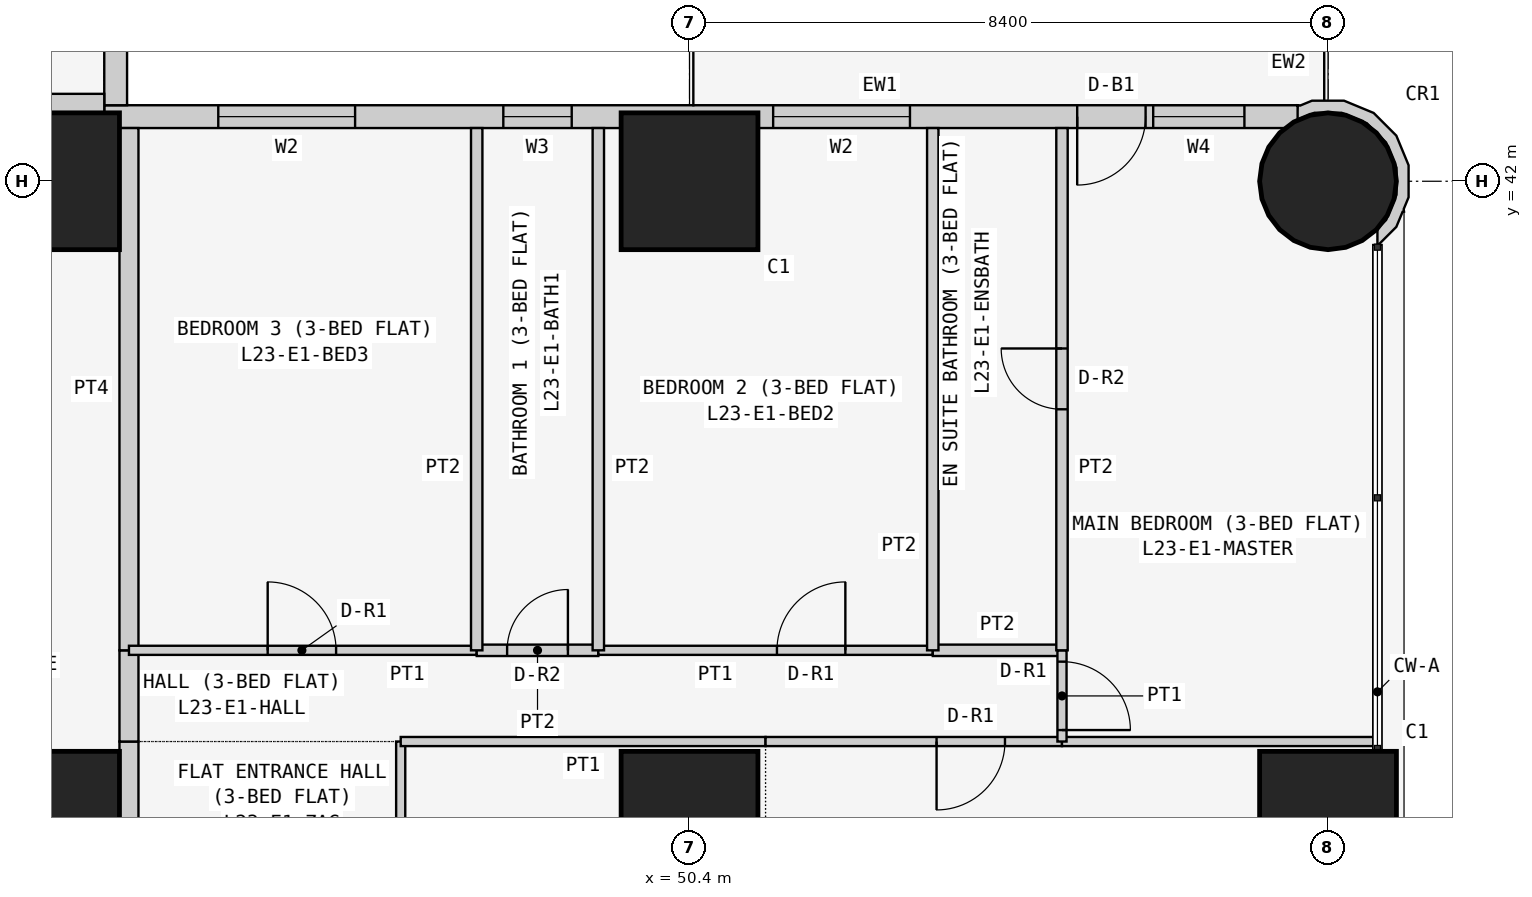
"""IFC4 building model, lengths in metres.
Left out: names, types, materials, properties, quantities, classifications, styles, units other than length and angle.
Written with IfcOpenShell. Run it as: python <this file> out.ifc"""

import sys

from ifc_helpers import new_model, si_unit, direction, frame, frame_2d, origin, origin_2d, place, context, subcontext, project, spatial, polyline, rectangle, circle, outline, extrude, element, fill, save


model = new_model("IFC4")
c1 = context("Model", 3, precision=1e-05, world=origin(), true_north=direction((0.0, 1.0)))
c2 = subcontext(c1, "Body", "Model", "MODEL_VIEW")
j1 = project(units=[si_unit("LENGTHUNIT", "METRE"), si_unit("PLANEANGLEUNIT", "RADIAN")], contexts=[c1])
p1 = place(None, origin())
s1 = spatial("IfcSite", under=j1, at=p1, CompositionType="ELEMENT")
p2 = place(p1, origin())
s2 = spatial("IfcBuilding", under=s1, at=p2, CompositionType="ELEMENT")
p3 = place(p2, frame((0.0, 0.0, 92.1)))
s3 = spatial("IfcBuildingStorey", under=s2, at=p3, CompositionType="ELEMENT", Elevation=92.1)
for number, where, z_axis, x_axis in (
    (1, (42.0, 33.6, 0.0), (0.0, 0.0, 1.0), (1.0, 0.0, 0.0)),
    (2, (42.0, 42.0, 0.0), (0.0, 0.0, 1.0), (1.0, 0.0, 0.0)),
    (3, (50.4, 33.6, 0.0), (0.0, 0.0, 1.0), (1.0, 0.0, 0.0)),
    (4, (50.4, 42.0, 0.0), (0.0, 0.0, 1.0), (1.0, 0.0, 0.0)),
    (5, (58.8, 33.6, 0.0), (0.0, 0.0, 1.0), (1.0, 0.0, 0.0)),
):
    element("IfcColumn", number, at=place(p3, frame(where, z_axis=z_axis, x_axis=x_axis)), inside=s3, PredefinedType="COLUMN", context=c2, shape_type="SweptSolid", body=[
        extrude(rectangle(XDim=1.8, YDim=1.8, at=origin_2d()), origin(), (0.0, 0.0, 1.0), 3.6),
    ])
p4 = place(p3, frame((58.8, 42.0, 0.0), z_axis=(0.0, 0.0, 1.0), x_axis=(1.0, 0.0, 0.0)))
e6 = element("IfcColumn", 6, at=p4, inside=s3, PredefinedType="COLUMN", context=c2, shape_type="SweptSolid", body=[
    extrude(circle(Radius=0.9, at=origin_2d()), origin(), (0.0, 0.0, 1.0), 3.6),
])
p5 = place(p3, frame((58.4, 42.85, 0.0), z_axis=(0.0, 0.0, 1.0), x_axis=(-1.0, 0.0, 0.0)))
e7 = element("IfcWall", 7, at=p5, inside=s3, PredefinedType="SOLIDWALL", context=c2, shape_type="SweptSolid", body=[
    extrude(rectangle(XDim=15.7, YDim=0.3, at=frame_2d((7.85, 0.0))), origin(), (0.0, 0.0, 1.0), 3.45),
])
p6 = place(p5, frame((12.4, 0.0, 0.9)))
e8 = element("IfcOpeningElement", 8, at=p6, cuts=e7, PredefinedType="OPENING", context=c2, shape_type="SweptSolid", body=[
    extrude(rectangle(XDim=1.8, YDim=1.5, at=frame_2d((0.9, 0.75))), frame((0.0, 0.16, 0.0), z_axis=(0.0, -1.0, 0.0), x_axis=(1.0, 0.0, 0.0)), (0.0, 0.0, 1.0), 0.32),
])
p7 = place(p5, frame((9.55, 0.0, 1.5)))
e9 = element("IfcOpeningElement", 9, at=p7, cuts=e7, PredefinedType="OPENING", context=c2, shape_type="SweptSolid", body=[
    extrude(rectangle(XDim=0.9, YDim=0.7, at=frame_2d((0.45, 0.35))), frame((0.0, 0.16, 0.0), z_axis=(0.0, -1.0, 0.0), x_axis=(1.0, 0.0, 0.0)), (0.0, 0.0, 1.0), 0.32),
])
p8 = place(p5, frame((5.1, 0.0, 0.9)))
e10 = element("IfcOpeningElement", 10, at=p8, cuts=e7, PredefinedType="OPENING", context=c2, shape_type="SweptSolid", body=[
    extrude(rectangle(XDim=1.8, YDim=1.5, at=frame_2d((0.9, 0.75))), frame((0.0, 0.16, 0.0), z_axis=(0.0, -1.0, 0.0), x_axis=(1.0, 0.0, 0.0)), (0.0, 0.0, 1.0), 0.32),
])
p9 = place(p5, frame((2.0, 0.0, 0.0)))
e11 = element("IfcOpeningElement", 11, at=p9, cuts=e7, PredefinedType="OPENING", context=c2, shape_type="SweptSolid", body=[
    extrude(rectangle(XDim=0.9, YDim=2.4, at=frame_2d((0.45, 1.2))), frame((0.0, 0.16, 0.0), z_axis=(0.0, -1.0, 0.0), x_axis=(1.0, 0.0, 0.0)), (0.0, 0.0, 1.0), 0.32),
])
p10 = place(p5, frame((0.7, 0.0, 0.9)))
e12 = element("IfcOpeningElement", 12, at=p10, cuts=e7, PredefinedType="OPENING", context=c2, shape_type="SweptSolid", body=[
    extrude(rectangle(XDim=1.2, YDim=1.5, at=frame_2d((0.6, 0.75))), frame((0.0, 0.16, 0.0), z_axis=(0.0, -1.0, 0.0), x_axis=(1.0, 0.0, 0.0)), (0.0, 0.0, 1.0), 0.32),
])
p11 = place(p3, frame((42.85, 43.0, 0.0), z_axis=(0.0, 0.0, 1.0), x_axis=(0.0, 1.0, 0.0)))
e13 = element("IfcWall", 13, at=p11, inside=s3, PredefinedType="SOLIDWALL", context=c2, shape_type="SweptSolid", body=[
    extrude(rectangle(XDim=15.4, YDim=0.3, at=frame_2d((7.7, 0.0))), origin(), (0.0, 0.0, 1.0), 3.45),
])
p12 = place(p11, frame((1.2, 0.0, 0.9)))
e14 = element("IfcOpeningElement", 14, at=p12, cuts=e13, PredefinedType="OPENING", context=c2, shape_type="SweptSolid", body=[
    extrude(rectangle(XDim=1.8, YDim=1.5, at=frame_2d((0.9, 0.75))), frame((0.0, 0.16, 0.0), z_axis=(0.0, -1.0, 0.0), x_axis=(1.0, 0.0, 0.0)), (0.0, 0.0, 1.0), 0.32),
])
p13 = place(p11, frame((4.95, 0.0, 1.5)))
e15 = element("IfcOpeningElement", 15, at=p13, cuts=e13, PredefinedType="OPENING", context=c2, shape_type="SweptSolid", body=[
    extrude(rectangle(XDim=0.9, YDim=0.7, at=frame_2d((0.45, 0.35))), frame((0.0, 0.16, 0.0), z_axis=(0.0, -1.0, 0.0), x_axis=(1.0, 0.0, 0.0)), (0.0, 0.0, 1.0), 0.32),
])
p14 = place(p11, frame((8.5, 0.0, 0.9)))
e16 = element("IfcOpeningElement", 16, at=p14, cuts=e13, PredefinedType="OPENING", context=c2, shape_type="SweptSolid", body=[
    extrude(rectangle(XDim=1.8, YDim=1.5, at=frame_2d((0.9, 0.75))), frame((0.0, 0.16, 0.0), z_axis=(0.0, -1.0, 0.0), x_axis=(1.0, 0.0, 0.0)), (0.0, 0.0, 1.0), 0.32),
])
p15 = place(p11, frame((12.5, 0.0, 0.0)))
e17 = element("IfcOpeningElement", 17, at=p15, cuts=e13, PredefinedType="OPENING", context=c2, shape_type="SweptSolid", body=[
    extrude(rectangle(XDim=0.9, YDim=2.4, at=frame_2d((0.45, 1.2))), frame((0.0, 0.16, 0.0), z_axis=(0.0, -1.0, 0.0), x_axis=(1.0, 0.0, 0.0)), (0.0, 0.0, 1.0), 0.32),
])
p16 = place(p11, frame((13.5, 0.0, 0.9)))
e18 = element("IfcOpeningElement", 18, at=p16, cuts=e13, PredefinedType="OPENING", context=c2, shape_type="SweptSolid", body=[
    extrude(rectangle(XDim=1.2, YDim=1.5, at=frame_2d((0.6, 0.75))), frame((0.0, 0.16, 0.0), z_axis=(0.0, -1.0, 0.0), x_axis=(1.0, 0.0, 0.0)), (0.0, 0.0, 1.0), 0.32),
])
p17 = place(p3, frame((59.411, 41.233, 0.0), z_axis=(0.0, 0.0, 1.0), x_axis=(0.926129809145, 0.377204953059, 0.0)))
e19 = element("IfcWall", 19, at=p17, inside=s3, PredefinedType="SOLIDWALL", context=c2, shape_type="SweptSolid", body=[
    extrude(outline(polyline([(0.626, 0.345), (0.785, 0.736), (0.782, 1.157), (0.619, 1.546), (0.319, 1.843), (-0.072, 2.002), (-0.24, 2.001), (-0.27, 2.017), (-0.37, 1.841), (-0.102, 1.842), (0.23, 1.707), (0.485, 1.455), (0.624, 1.125), (0.626, 0.766), (0.491, 0.434), (0.238, 0.179), (0.09, 0.117), (0.011, -0.078), (0.024, -0.083), (0.329, 0.045), (0.48, 0.198), (0.499, 0.193), (0.508, 0.225), (0.626, 0.345)])), origin(), (0.0, 0.0, 1.0), 3.45),
])
p18 = place(p3, frame((36.229, 43.025, 0.0), z_axis=(0.0, 0.0, 1.0), x_axis=(1.0, 0.0, 0.0)))
e20 = element("IfcWall", 20, at=p18, inside=s3, PredefinedType="PARTITIONING", context=c2, shape_type="SweptSolid", body=[
    extrude(rectangle(XDim=6.471, YDim=0.25, at=frame_2d((3.235, 0.0))), origin(), (0.0, 0.0, 1.0), 3.45),
])
p19 = place(p3, frame((43.025, 34.629, 0.0), z_axis=(0.0, 0.0, 1.0), x_axis=(0.0, -1.0, 0.0)))
e21 = element("IfcWall", 21, at=p19, inside=s3, PredefinedType="PARTITIONING", context=c2, shape_type="SweptSolid", body=[
    extrude(rectangle(XDim=5.229, YDim=0.25, at=frame_2d((2.615, 0.0))), origin(), (0.0, 0.0, 1.0), 3.45),
])
p20 = place(p19, frame((2.129, 0.0, 0.0)))
e22 = element("IfcOpeningElement", 22, at=p20, cuts=e21, PredefinedType="OPENING", context=c2, shape_type="SweptSolid", body=[
    extrude(rectangle(XDim=1.0, YDim=2.1, at=frame_2d((0.5, 1.05))), frame((0.0, 0.135, 0.0), z_axis=(0.0, -1.0, 0.0), x_axis=(1.0, 0.0, 0.0)), (0.0, 0.0, 1.0), 0.27),
])
p21 = place(p3, frame((43.025, 35.829, 0.0), z_axis=(0.0, 0.0, 1.0), x_axis=(0.0, -1.0, 0.0)))
e23 = element("IfcWall", 23, at=p21, inside=s3, PredefinedType="PARTITIONING", context=c2, shape_type="SweptSolid", body=[
    extrude(rectangle(XDim=1.2, YDim=0.25, at=frame_2d((0.6, 0.0))), origin(), (0.0, 0.0, 1.0), 3.45),
])
p22 = place(p3, frame((43.025, 42.7, 0.0), z_axis=(0.0, 0.0, 1.0), x_axis=(0.0, -1.0, 0.0)))
e24 = element("IfcWall", 24, at=p22, inside=s3, PredefinedType="PARTITIONING", context=c2, shape_type="SweptSolid", body=[
    extrude(rectangle(XDim=6.871, YDim=0.25, at=frame_2d((3.436, 0.0))), origin(), (0.0, 0.0, 1.0), 3.45),
])
p23 = place(p3, frame((46.6, 29.4, 0.0), z_axis=(0.0, 0.0, 1.0), x_axis=(0.0, 1.0, 0.0)))
e25 = element("IfcWall", 25, at=p23, inside=s3, PredefinedType="PARTITIONING", context=c2, shape_type="SweptSolid", body=[
    extrude(rectangle(XDim=5.229, YDim=0.12, at=frame_2d((2.615, 0.0))), origin(), (0.0, 0.0, 1.0), 3.45),
])
p24 = place(p23, frame((1.05, 0.0, 0.0)))
e26 = element("IfcOpeningElement", 26, at=p24, cuts=e25, PredefinedType="OPENING", context=c2, shape_type="SweptSolid", body=[
    extrude(rectangle(XDim=0.9, YDim=2.1, at=frame_2d((0.45, 1.05))), frame((0.0, 0.07, 0.0), z_axis=(0.0, -1.0, 0.0), x_axis=(1.0, 0.0, 0.0)), (0.0, 0.0, 1.0), 0.14),
])
p25 = place(p3, frame((51.4, 34.629, 0.0), z_axis=(0.0, 0.0, 1.0), x_axis=(-1.0, 0.0, 0.0)))
e27 = element("IfcWall", 27, at=p25, inside=s3, PredefinedType="PARTITIONING", context=c2, shape_type="SweptSolid", body=[
    extrude(rectangle(XDim=4.8, YDim=0.12, at=frame_2d((2.4, 0.0))), origin(), (0.0, 0.0, 1.0), 3.45),
])
p26 = place(p3, frame((55.3, 34.629, 0.0), z_axis=(0.0, 0.0, 1.0), x_axis=(-1.0, 0.0, 0.0)))
e28 = element("IfcWall", 28, at=p26, inside=s3, PredefinedType="PARTITIONING", context=c2, shape_type="SweptSolid", body=[
    extrude(rectangle(XDim=3.9, YDim=0.12, at=frame_2d((1.95, 0.0))), origin(), (0.0, 0.0, 1.0), 3.45),
])
p27 = place(p26, frame((0.75, 0.0, 0.0)))
e29 = element("IfcOpeningElement", 29, at=p27, cuts=e28, PredefinedType="OPENING", context=c2, shape_type="SweptSolid", body=[
    extrude(rectangle(XDim=0.9, YDim=2.1, at=frame_2d((0.45, 1.05))), frame((0.0, 0.07, 0.0), z_axis=(0.0, -1.0, 0.0), x_axis=(1.0, 0.0, 0.0)), (0.0, 0.0, 1.0), 0.14),
])
p28 = place(p3, frame((59.45, 34.629, 0.0), z_axis=(0.0, 0.0, 1.0), x_axis=(-1.0, 0.0, 0.0)))
e30 = element("IfcWall", 30, at=p28, inside=s3, PredefinedType="PARTITIONING", context=c2, shape_type="SweptSolid", body=[
    extrude(rectangle(XDim=4.15, YDim=0.12, at=frame_2d((2.075, 0.0))), origin(), (0.0, 0.0, 1.0), 3.45),
])
p29 = place(p3, frame((47.6, 35.829, 0.0), z_axis=(0.0, 0.0, 1.0), x_axis=(-1.0, 0.0, 0.0)))
e31 = element("IfcWall", 31, at=p29, inside=s3, PredefinedType="PARTITIONING", context=c2, shape_type="SweptSolid", body=[
    extrude(rectangle(XDim=4.575, YDim=0.12, at=frame_2d((2.288, 0.0))), origin(), (0.0, 0.0, 1.0), 3.45),
])
p30 = place(p29, frame((1.85, 0.0, 0.0)))
e32 = element("IfcOpeningElement", 32, at=p30, cuts=e31, PredefinedType="OPENING", context=c2, shape_type="SweptSolid", body=[
    extrude(rectangle(XDim=0.9, YDim=2.1, at=frame_2d((0.45, 1.05))), frame((0.0, 0.07, 0.0), z_axis=(0.0, -1.0, 0.0), x_axis=(1.0, 0.0, 0.0)), (0.0, 0.0, 1.0), 0.14),
])
p31 = place(p3, frame((49.2, 35.829, 0.0), z_axis=(0.0, 0.0, 1.0), x_axis=(-1.0, 0.0, 0.0)))
e33 = element("IfcWall", 33, at=p31, inside=s3, PredefinedType="PARTITIONING", context=c2, shape_type="SweptSolid", body=[
    extrude(rectangle(XDim=1.6, YDim=0.15, at=frame_2d((0.8, 0.0))), origin(), (0.0, 0.0, 1.0), 3.45),
])
p32 = place(p31, frame((0.4, 0.0, 0.0)))
e34 = element("IfcOpeningElement", 34, at=p32, cuts=e33, PredefinedType="OPENING", context=c2, shape_type="SweptSolid", body=[
    extrude(rectangle(XDim=0.8, YDim=2.1, at=frame_2d((0.4, 1.05))), frame((0.0, 0.085, 0.0), z_axis=(0.0, -1.0, 0.0), x_axis=(1.0, 0.0, 0.0)), (0.0, 0.0, 1.0), 0.17),
])
p33 = place(p3, frame((53.6, 35.829, 0.0), z_axis=(0.0, 0.0, 1.0), x_axis=(-1.0, 0.0, 0.0)))
e35 = element("IfcWall", 35, at=p33, inside=s3, PredefinedType="PARTITIONING", context=c2, shape_type="SweptSolid", body=[
    extrude(rectangle(XDim=4.4, YDim=0.12, at=frame_2d((2.2, 0.0))), origin(), (0.0, 0.0, 1.0), 3.45),
])
p34 = place(p33, frame((1.15, 0.0, 0.0)))
e36 = element("IfcOpeningElement", 36, at=p34, cuts=e35, PredefinedType="OPENING", context=c2, shape_type="SweptSolid", body=[
    extrude(rectangle(XDim=0.9, YDim=2.1, at=frame_2d((0.45, 1.05))), frame((0.0, 0.07, 0.0), z_axis=(0.0, -1.0, 0.0), x_axis=(1.0, 0.0, 0.0)), (0.0, 0.0, 1.0), 0.14),
])
p35 = place(p3, frame((55.3, 35.829, 0.0), z_axis=(0.0, 0.0, 1.0), x_axis=(-1.0, 0.0, 0.0)))
e37 = element("IfcWall", 37, at=p35, inside=s3, PredefinedType="PARTITIONING", context=c2, shape_type="SweptSolid", body=[
    extrude(rectangle(XDim=1.7, YDim=0.15, at=frame_2d((0.85, 0.0))), origin(), (0.0, 0.0, 1.0), 3.45),
])
p36 = place(p3, frame((55.3, 34.629, 0.0), z_axis=(0.0, 0.0, 1.0), x_axis=(0.0, 1.0, 0.0)))
e38 = element("IfcWall", 38, at=p36, inside=s3, PredefinedType="PARTITIONING", context=c2, shape_type="SweptSolid", body=[
    extrude(rectangle(XDim=1.2, YDim=0.12, at=frame_2d((0.6, 0.0))), origin(), (0.0, 0.0, 1.0), 3.45),
])
p37 = place(p36, frame((0.151, 0.0, 0.0)))
e39 = element("IfcOpeningElement", 39, at=p37, cuts=e38, PredefinedType="OPENING", context=c2, shape_type="SweptSolid", body=[
    extrude(rectangle(XDim=0.9, YDim=2.1, at=frame_2d((0.45, 1.05))), frame((0.0, 0.07, 0.0), z_axis=(0.0, -1.0, 0.0), x_axis=(1.0, 0.0, 0.0)), (0.0, 0.0, 1.0), 0.14),
])
for number, where, z_axis, x_axis in (
    (40, (47.6, 35.829, 0.0), (0.0, 0.0, 1.0), (0.0, 1.0, 0.0)),
    (41, (49.2, 35.829, 0.0), (0.0, 0.0, 1.0), (0.0, 1.0, 0.0)),
    (42, (53.6, 35.829, 0.0), (0.0, 0.0, 1.0), (0.0, 1.0, 0.0)),
):
    element("IfcWall", number, at=place(p3, frame(where, z_axis=z_axis, x_axis=x_axis)), inside=s3, PredefinedType="PARTITIONING", context=c2, shape_type="SweptSolid", body=[
        extrude(rectangle(XDim=6.871, YDim=0.15, at=frame_2d((3.436, 0.0))), origin(), (0.0, 0.0, 1.0), 3.45),
    ])
p38 = place(p3, frame((55.3, 35.829, 0.0), z_axis=(0.0, 0.0, 1.0), x_axis=(0.0, 1.0, 0.0)))
e43 = element("IfcWall", 43, at=p38, inside=s3, PredefinedType="PARTITIONING", context=c2, shape_type="SweptSolid", body=[
    extrude(rectangle(XDim=6.871, YDim=0.15, at=frame_2d((3.436, 0.0))), origin(), (0.0, 0.0, 1.0), 3.45),
])
p39 = place(p38, frame((3.171, 0.0, 0.0)))
e44 = element("IfcOpeningElement", 44, at=p39, cuts=e43, PredefinedType="OPENING", context=c2, shape_type="SweptSolid", body=[
    extrude(rectangle(XDim=0.8, YDim=2.1, at=frame_2d((0.4, 1.05))), frame((0.0, 0.085, 0.0), z_axis=(0.0, -1.0, 0.0), x_axis=(1.0, 0.0, 0.0)), (0.0, 0.0, 1.0), 0.17),
])
p40 = place(p6, origin())
e45 = element("IfcWindow", 45, at=p40, inside=s3, PartitioningType="SINGLE_PANEL", PredefinedType="WINDOW", context=c2, shape_type="SweptSolid", body=[
    extrude(rectangle(XDim=1.8, YDim=1.5, at=frame_2d((0.9, 0.75))), frame((0.0, 0.03, 0.0), z_axis=(0.0, -1.0, 0.0), x_axis=(1.0, 0.0, 0.0)), (0.0, 0.0, 1.0), 0.06),
])
fill(e8, e45)
p41 = place(p7, origin())
e46 = element("IfcWindow", 46, at=p41, inside=s3, PartitioningType="SINGLE_PANEL", PredefinedType="WINDOW", context=c2, shape_type="SweptSolid", body=[
    extrude(rectangle(XDim=0.9, YDim=0.7, at=frame_2d((0.45, 0.35))), frame((0.0, 0.03, 0.0), z_axis=(0.0, -1.0, 0.0), x_axis=(1.0, 0.0, 0.0)), (0.0, 0.0, 1.0), 0.06),
])
fill(e9, e46)
p42 = place(p8, origin())
e47 = element("IfcWindow", 47, at=p42, inside=s3, PartitioningType="SINGLE_PANEL", PredefinedType="WINDOW", context=c2, shape_type="SweptSolid", body=[
    extrude(rectangle(XDim=1.8, YDim=1.5, at=frame_2d((0.9, 0.75))), frame((0.0, 0.03, 0.0), z_axis=(0.0, -1.0, 0.0), x_axis=(1.0, 0.0, 0.0)), (0.0, 0.0, 1.0), 0.06),
])
fill(e10, e47)
p43 = place(p9, origin())
e48 = element("IfcDoor", 48, at=p43, inside=s3, OperationType="SINGLE_SWING_RIGHT", PredefinedType="DOOR", context=c2, shape_type="SweptSolid", body=[
    extrude(rectangle(XDim=0.9, YDim=2.4, at=frame_2d((0.45, 1.2))), frame((0.0, 0.025, 0.0), z_axis=(0.0, -1.0, 0.0), x_axis=(1.0, 0.0, 0.0)), (0.0, 0.0, 1.0), 0.05),
])
fill(e11, e48)
p44 = place(p10, origin())
e49 = element("IfcWindow", 49, at=p44, inside=s3, PartitioningType="SINGLE_PANEL", PredefinedType="WINDOW", context=c2, shape_type="SweptSolid", body=[
    extrude(rectangle(XDim=1.2, YDim=1.5, at=frame_2d((0.6, 0.75))), frame((0.0, 0.03, 0.0), z_axis=(0.0, -1.0, 0.0), x_axis=(1.0, 0.0, 0.0)), (0.0, 0.0, 1.0), 0.06),
])
fill(e12, e49)
p45 = place(p27, origin())
e50 = element("IfcDoor", 50, at=p45, inside=s3, OperationType="SINGLE_SWING_RIGHT", PredefinedType="DOOR", context=c2, shape_type="SweptSolid", body=[
    extrude(rectangle(XDim=0.9, YDim=2.1, at=frame_2d((0.45, 1.05))), frame((0.0, 0.025, 0.0), z_axis=(0.0, -1.0, 0.0), x_axis=(1.0, 0.0, 0.0)), (0.0, 0.0, 1.0), 0.05),
])
fill(e29, e50)
p46 = place(p30, frame((0.9, 0.0, 0.0), z_axis=(0.0, 0.0, 1.0), x_axis=(-1.0, 0.0, 0.0)))
e51 = element("IfcDoor", 51, at=p46, inside=s3, OperationType="SINGLE_SWING_LEFT", PredefinedType="DOOR", context=c2, shape_type="SweptSolid", body=[
    extrude(rectangle(XDim=0.9, YDim=2.1, at=frame_2d((0.45, 1.05))), frame((0.0, 0.025, 0.0), z_axis=(0.0, -1.0, 0.0), x_axis=(1.0, 0.0, 0.0)), (0.0, 0.0, 1.0), 0.05),
])
fill(e32, e51)
p47 = place(p32, frame((0.8, 0.0, 0.0), z_axis=(0.0, 0.0, 1.0), x_axis=(-1.0, 0.0, 0.0)))
e52 = element("IfcDoor", 52, at=p47, inside=s3, OperationType="SINGLE_SWING_RIGHT", PredefinedType="DOOR", context=c2, shape_type="SweptSolid", body=[
    extrude(rectangle(XDim=0.8, YDim=2.1, at=frame_2d((0.4, 1.05))), frame((0.0, 0.025, 0.0), z_axis=(0.0, -1.0, 0.0), x_axis=(1.0, 0.0, 0.0)), (0.0, 0.0, 1.0), 0.05),
])
fill(e34, e52)
p48 = place(p34, frame((0.9, 0.0, 0.0), z_axis=(0.0, 0.0, 1.0), x_axis=(-1.0, 0.0, 0.0)))
e53 = element("IfcDoor", 53, at=p48, inside=s3, OperationType="SINGLE_SWING_RIGHT", PredefinedType="DOOR", context=c2, shape_type="SweptSolid", body=[
    extrude(rectangle(XDim=0.9, YDim=2.1, at=frame_2d((0.45, 1.05))), frame((0.0, 0.025, 0.0), z_axis=(0.0, -1.0, 0.0), x_axis=(1.0, 0.0, 0.0)), (0.0, 0.0, 1.0), 0.05),
])
fill(e36, e53)
p49 = place(p37, frame((0.9, 0.0, 0.0), z_axis=(0.0, 0.0, 1.0), x_axis=(-1.0, 0.0, 0.0)))
e54 = element("IfcDoor", 54, at=p49, inside=s3, OperationType="SINGLE_SWING_RIGHT", PredefinedType="DOOR", context=c2, shape_type="SweptSolid", body=[
    extrude(rectangle(XDim=0.9, YDim=2.1, at=frame_2d((0.45, 1.05))), frame((0.0, 0.025, 0.0), z_axis=(0.0, -1.0, 0.0), x_axis=(1.0, 0.0, 0.0)), (0.0, 0.0, 1.0), 0.05),
])
fill(e39, e54)
p50 = place(p39, origin())
e55 = element("IfcDoor", 55, at=p50, inside=s3, OperationType="SINGLE_SWING_RIGHT", PredefinedType="DOOR", context=c2, shape_type="SweptSolid", body=[
    extrude(rectangle(XDim=0.8, YDim=2.1, at=frame_2d((0.4, 1.05))), frame((0.0, 0.025, 0.0), z_axis=(0.0, -1.0, 0.0), x_axis=(1.0, 0.0, 0.0)), (0.0, 0.0, 1.0), 0.05),
])
fill(e44, e55)
save(model, sys.argv[1])
